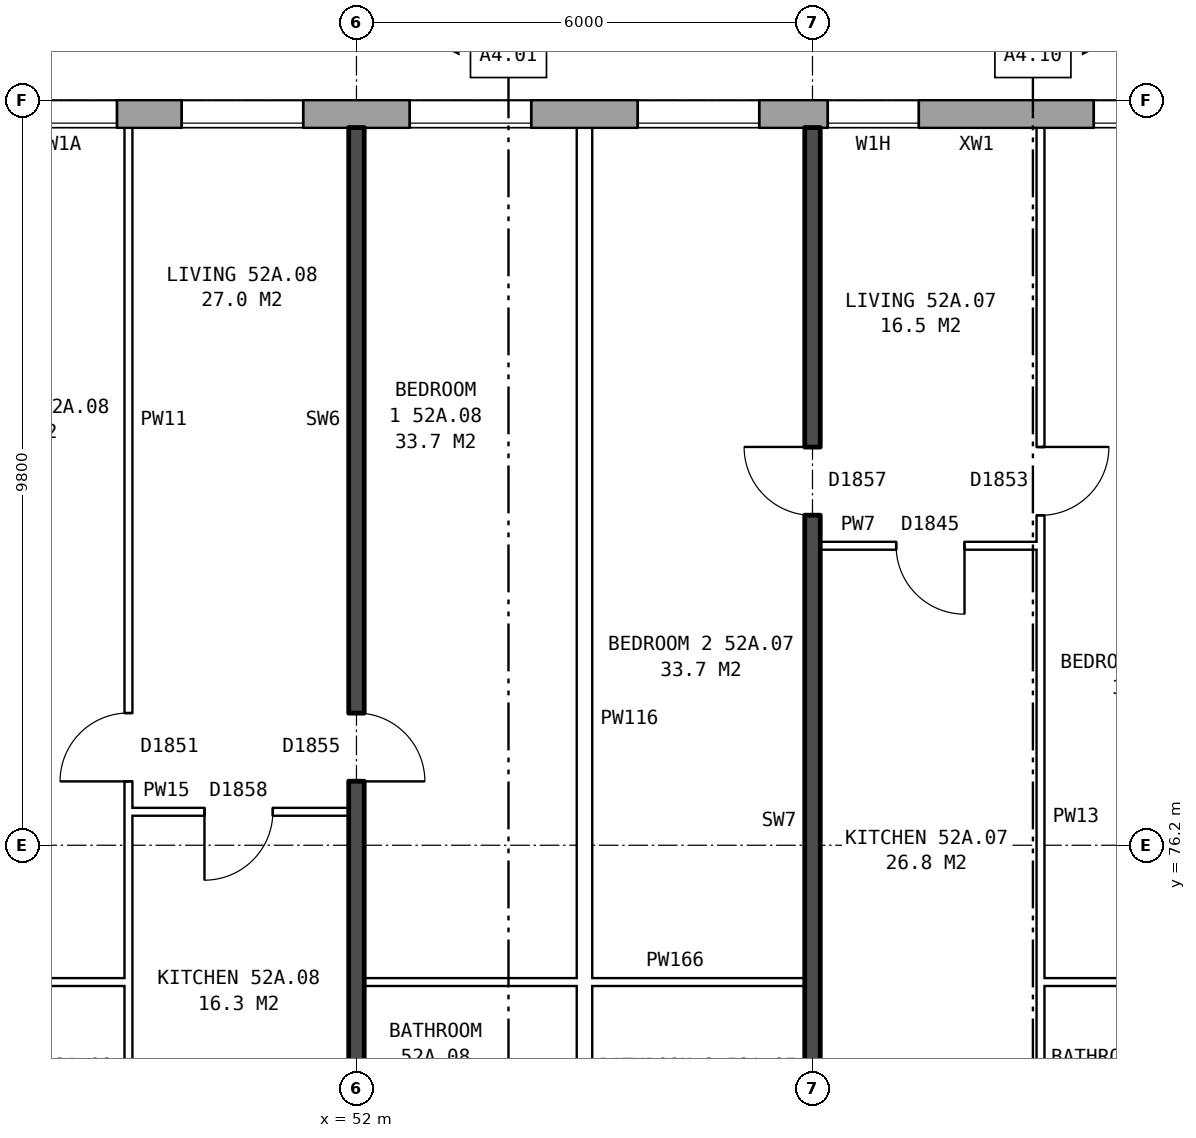
"""IFC4 building model, lengths in metres.
Left out: names, types, materials, properties, quantities, classifications, styles, units other than length and angle.
Written with IfcOpenShell. Run it as: python <this file> out.ifc"""

import sys

from ifc_helpers import new_model, si_unit, direction, frame, frame_2d, origin, place, context, subcontext, project, spatial, rectangle, extrude, element, fill, save


model = new_model("IFC4")
c1 = context("Model", 3, precision=1e-05, world=origin(), true_north=direction((0.0, 1.0)))
c2 = subcontext(c1, "Body", "Model", "MODEL_VIEW")
j1 = project(units=[si_unit("LENGTHUNIT", "METRE"), si_unit("PLANEANGLEUNIT", "RADIAN")], contexts=[c1])
p1 = place(None, origin())
s1 = spatial("IfcSite", under=j1, at=p1, CompositionType="ELEMENT")
p2 = place(p1, origin())
s2 = spatial("IfcBuilding", under=s1, at=p2, CompositionType="ELEMENT")
p3 = place(p2, frame((0.0, 0.0, 185.1)))
s3 = spatial("IfcBuildingStorey", under=s2, at=p3, CompositionType="ELEMENT", Elevation=185.1)
p4 = place(p3, frame((72.925, 85.82, 0.0), z_axis=(0.0, 0.0, 1.0), x_axis=(-1.0, 0.0, 0.0)))
e1 = element("IfcWall", 1, at=p4, inside=s3, PredefinedType="STANDARD", context=c2, shape_type="SweptSolid", body=[
    extrude(rectangle(XDim=39.601, YDim=0.36, at=frame_2d((19.8, 0.0))), origin(), (0.0, 0.0, 1.0), 2.85),
])
p5 = place(p4, frame((0.625, 0.0, 0.8)))
e2 = element("IfcOpeningElement", 2, at=p5, cuts=e1, PredefinedType="OPENING", context=c2, shape_type="SweptSolid", body=[
    extrude(rectangle(XDim=1.6, YDim=1.8, at=frame_2d((0.8, 0.9))), frame((0.0, 0.19, 0.0), z_axis=(0.0, -1.0, 0.0), x_axis=(1.0, 0.0, 0.0)), (0.0, 0.0, 1.0), 0.38),
])
p6 = place(p4, frame((3.625, 0.0, 0.8)))
e3 = element("IfcOpeningElement", 3, at=p6, cuts=e1, PredefinedType="OPENING", context=c2, shape_type="SweptSolid", body=[
    extrude(rectangle(XDim=1.6, YDim=1.8, at=frame_2d((0.8, 0.9))), frame((0.0, 0.19, 0.0), z_axis=(0.0, -1.0, 0.0), x_axis=(1.0, 0.0, 0.0)), (0.0, 0.0, 1.0), 0.38),
])
p7 = place(p4, frame((6.625, 0.0, 0.8)))
e4 = element("IfcOpeningElement", 4, at=p7, cuts=e1, PredefinedType="OPENING", context=c2, shape_type="SweptSolid", body=[
    extrude(rectangle(XDim=1.6, YDim=1.8, at=frame_2d((0.8, 0.9))), frame((0.0, 0.19, 0.0), z_axis=(0.0, -1.0, 0.0), x_axis=(1.0, 0.0, 0.0)), (0.0, 0.0, 1.0), 0.38),
])
p8 = place(p4, frame((9.625, 0.0, 0.8)))
e5 = element("IfcOpeningElement", 5, at=p8, cuts=e1, PredefinedType="OPENING", context=c2, shape_type="SweptSolid", body=[
    extrude(rectangle(XDim=1.6, YDim=1.8, at=frame_2d((0.8, 0.9))), frame((0.0, 0.19, 0.0), z_axis=(0.0, -1.0, 0.0), x_axis=(1.0, 0.0, 0.0)), (0.0, 0.0, 1.0), 0.38),
])
p9 = place(p4, frame((13.525, 0.0, 0.65)))
e6 = element("IfcOpeningElement", 6, at=p9, cuts=e1, PredefinedType="OPENING", context=c2, shape_type="SweptSolid", body=[
    extrude(rectangle(XDim=1.2, YDim=1.5, at=frame_2d((0.6, 0.75))), frame((0.0, 0.19, 0.0), z_axis=(0.0, -1.0, 0.0), x_axis=(1.0, 0.0, 0.0)), (0.0, 0.0, 1.0), 0.38),
])
p10 = place(p4, frame((15.625, 0.0, 0.8)))
e7 = element("IfcOpeningElement", 7, at=p10, cuts=e1, PredefinedType="OPENING", context=c2, shape_type="SweptSolid", body=[
    extrude(rectangle(XDim=1.6, YDim=1.8, at=frame_2d((0.8, 0.9))), frame((0.0, 0.19, 0.0), z_axis=(0.0, -1.0, 0.0), x_axis=(1.0, 0.0, 0.0)), (0.0, 0.0, 1.0), 0.38),
])
p11 = place(p4, frame((18.625, 0.0, 0.8)))
e8 = element("IfcOpeningElement", 8, at=p11, cuts=e1, PredefinedType="OPENING", context=c2, shape_type="SweptSolid", body=[
    extrude(rectangle(XDim=1.6, YDim=1.8, at=frame_2d((0.8, 0.9))), frame((0.0, 0.19, 0.0), z_axis=(0.0, -1.0, 0.0), x_axis=(1.0, 0.0, 0.0)), (0.0, 0.0, 1.0), 0.38),
])
p12 = place(p4, frame((21.625, 0.0, 0.8)))
e9 = element("IfcOpeningElement", 9, at=p12, cuts=e1, PredefinedType="OPENING", context=c2, shape_type="SweptSolid", body=[
    extrude(rectangle(XDim=1.6, YDim=1.8, at=frame_2d((0.8, 0.9))), frame((0.0, 0.19, 0.0), z_axis=(0.0, -1.0, 0.0), x_axis=(1.0, 0.0, 0.0)), (0.0, 0.0, 1.0), 0.38),
])
p13 = place(p4, frame((24.075, 0.0, 0.8)))
e10 = element("IfcOpeningElement", 10, at=p13, cuts=e1, PredefinedType="OPENING", context=c2, shape_type="SweptSolid", body=[
    extrude(rectangle(XDim=1.4, YDim=1.8, at=frame_2d((0.7, 0.9))), frame((0.0, 0.19, 0.0), z_axis=(0.0, -1.0, 0.0), x_axis=(1.0, 0.0, 0.0)), (0.0, 0.0, 1.0), 0.38),
])
p14 = place(p4, frame((27.625, 0.0, 1.7)))
e11 = element("IfcOpeningElement", 11, at=p14, cuts=e1, PredefinedType="OPENING", context=c2, shape_type="SweptSolid", body=[
    extrude(rectangle(XDim=0.8, YDim=0.9, at=frame_2d((0.4, 0.45))), frame((0.0, 0.19, 0.0), z_axis=(0.0, -1.0, 0.0), x_axis=(1.0, 0.0, 0.0)), (0.0, 0.0, 1.0), 0.38),
])
p15 = place(p4, frame((30.625, 0.0, 0.8)))
e12 = element("IfcOpeningElement", 12, at=p15, cuts=e1, PredefinedType="OPENING", context=c2, shape_type="SweptSolid", body=[
    extrude(rectangle(XDim=1.6, YDim=1.8, at=frame_2d((0.8, 0.9))), frame((0.0, 0.19, 0.0), z_axis=(0.0, -1.0, 0.0), x_axis=(1.0, 0.0, 0.0)), (0.0, 0.0, 1.0), 0.38),
])
p16 = place(p4, frame((33.625, 0.0, 0.8)))
e13 = element("IfcOpeningElement", 13, at=p16, cuts=e1, PredefinedType="OPENING", context=c2, shape_type="SweptSolid", body=[
    extrude(rectangle(XDim=1.6, YDim=1.8, at=frame_2d((0.8, 0.9))), frame((0.0, 0.19, 0.0), z_axis=(0.0, -1.0, 0.0), x_axis=(1.0, 0.0, 0.0)), (0.0, 0.0, 1.0), 0.38),
])
p17 = place(p4, frame((36.625, 0.0, 0.8)))
e14 = element("IfcOpeningElement", 14, at=p17, cuts=e1, PredefinedType="OPENING", context=c2, shape_type="SweptSolid", body=[
    extrude(rectangle(XDim=1.6, YDim=1.8, at=frame_2d((0.8, 0.9))), frame((0.0, 0.19, 0.0), z_axis=(0.0, -1.0, 0.0), x_axis=(1.0, 0.0, 0.0)), (0.0, 0.0, 1.0), 0.38),
])
p18 = place(p4, frame((25.775, 0.0, 0.8)))
e15 = element("IfcOpeningElement", 15, at=p18, cuts=e1, PredefinedType="OPENING", context=c2, shape_type="SweptSolid", body=[
    extrude(rectangle(XDim=0.6, YDim=0.9, at=frame_2d((0.3, 0.45))), frame((0.0, 0.19, 0.0), z_axis=(0.0, -1.0, 0.0), x_axis=(1.0, 0.0, 0.0)), (0.0, 0.0, 1.0), 0.38),
])
p19 = place(p4, frame((28.725, 0.0, 0.8)))
e16 = element("IfcOpeningElement", 16, at=p19, cuts=e1, PredefinedType="OPENING", context=c2, shape_type="SweptSolid", body=[
    extrude(rectangle(XDim=1.6, YDim=1.8, at=frame_2d((0.8, 0.9))), frame((0.0, 0.19, 0.0), z_axis=(0.0, -1.0, 0.0), x_axis=(1.0, 0.0, 0.0)), (0.0, 0.0, 1.0), 0.38),
])
p20 = place(p3, frame((46.1, 74.4, 0.0), z_axis=(0.0, 0.0, 1.0), x_axis=(1.0, 0.0, 0.0)))
e17 = element("IfcWall", 17, at=p20, inside=s3, PredefinedType="PARTITIONING", context=c2, shape_type="SweptSolid", body=[
    extrude(rectangle(XDim=2.9, YDim=0.1, at=frame_2d((1.45, 0.0))), origin(), (0.0, 0.0, 1.0), 2.85),
])
p21 = place(p3, frame((52.1, 74.4, 0.0), z_axis=(0.0, 0.0, 1.0), x_axis=(1.0, 0.0, 0.0)))
e18 = element("IfcWall", 18, at=p21, inside=s3, PredefinedType="PARTITIONING", context=c2, shape_type="SweptSolid", body=[
    extrude(rectangle(XDim=5.8, YDim=0.1, at=frame_2d((2.9, 0.0))), origin(), (0.0, 0.0, 1.0), 2.85),
])
p22 = place(p3, frame((61.0, 74.4, 0.0), z_axis=(0.0, 0.0, 1.0), x_axis=(1.0, 0.0, 0.0)))
e19 = element("IfcWall", 19, at=p22, inside=s3, PredefinedType="PARTITIONING", context=c2, shape_type="SweptSolid", body=[
    extrude(rectangle(XDim=2.64, YDim=0.1, at=frame_2d((1.32, 0.0))), origin(), (0.0, 0.0, 1.0), 2.85),
])
p23 = place(p3, frame((49.0, 76.64, 0.0), z_axis=(0.0, 0.0, 1.0), x_axis=(1.0, 0.0, 0.0)))
e20 = element("IfcWall", 20, at=p23, inside=s3, PredefinedType="PARTITIONING", context=c2, shape_type="SweptSolid", body=[
    extrude(rectangle(XDim=2.9, YDim=0.1, at=frame_2d((1.45, 0.0))), origin(), (0.0, 0.0, 1.0), 2.85),
])
p24 = place(p23, frame((1.0, 0.0, 0.0)))
e21 = element("IfcOpeningElement", 21, at=p24, cuts=e20, PredefinedType="OPENING", context=c2, shape_type="SweptSolid", body=[
    extrude(rectangle(XDim=0.9, YDim=2.1, at=frame_2d((0.45, 1.05))), frame((0.0, 0.06, 0.0), z_axis=(0.0, -1.0, 0.0), x_axis=(1.0, 0.0, 0.0)), (0.0, 0.0, 1.0), 0.12),
])
p25 = place(p3, frame((58.1, 80.14, 0.0), z_axis=(0.0, 0.0, 1.0), x_axis=(1.0, 0.0, 0.0)))
e22 = element("IfcWall", 22, at=p25, inside=s3, PredefinedType="PARTITIONING", context=c2, shape_type="SweptSolid", body=[
    extrude(rectangle(XDim=2.9, YDim=0.1, at=frame_2d((1.45, 0.0))), origin(), (0.0, 0.0, 1.0), 2.85),
])
p26 = place(p25, frame((1.0, 0.0, 0.0)))
e23 = element("IfcOpeningElement", 23, at=p26, cuts=e22, PredefinedType="OPENING", context=c2, shape_type="SweptSolid", body=[
    extrude(rectangle(XDim=0.9, YDim=2.1, at=frame_2d((0.45, 1.05))), frame((0.0, 0.06, 0.0), z_axis=(0.0, -1.0, 0.0), x_axis=(1.0, 0.0, 0.0)), (0.0, 0.0, 1.0), 0.12),
])
p27 = place(p3, frame((49.0, 71.3, 0.0), z_axis=(0.0, 0.0, 1.0), x_axis=(0.0, 1.0, 0.0)))
e24 = element("IfcWall", 24, at=p27, inside=s3, PredefinedType="PARTITIONING", context=c2, shape_type="SweptSolid", body=[
    extrude(rectangle(XDim=14.34, YDim=0.1, at=frame_2d((7.17, 0.0))), origin(), (0.0, 0.0, 1.0), 2.85),
])
p28 = place(p27, frame((5.74, 0.0, 0.0)))
e25 = element("IfcOpeningElement", 25, at=p28, cuts=e24, PredefinedType="OPENING", context=c2, shape_type="SweptSolid", body=[
    extrude(rectangle(XDim=0.9, YDim=2.1, at=frame_2d((0.45, 1.05))), frame((0.0, 0.06, 0.0), z_axis=(0.0, -1.0, 0.0), x_axis=(1.0, 0.0, 0.0)), (0.0, 0.0, 1.0), 0.12),
])
p29 = place(p27, frame((0.4, 0.0, 0.0)))
e26 = element("IfcOpeningElement", 26, at=p29, cuts=e24, PredefinedType="OPENING", context=c2, shape_type="SweptSolid", body=[
    extrude(rectangle(XDim=0.9, YDim=2.1, at=frame_2d((0.45, 1.05))), frame((0.0, 0.06, 0.0), z_axis=(0.0, -1.0, 0.0), x_axis=(1.0, 0.0, 0.0)), (0.0, 0.0, 1.0), 0.12),
])
p30 = place(p3, frame((52.0, 71.2, 0.0), z_axis=(0.0, 0.0, 1.0), x_axis=(0.0, 1.0, 0.0)))
e27 = element("IfcWall", 27, at=p30, inside=s3, PredefinedType="SOLIDWALL", context=c2, shape_type="SweptSolid", body=[
    extrude(rectangle(XDim=14.44, YDim=0.2, at=frame_2d((7.22, 0.0))), origin(), (0.0, 0.0, 1.0), 2.85),
])
p31 = place(p30, frame((5.84, 0.0, 0.0)))
e28 = element("IfcOpeningElement", 28, at=p31, cuts=e27, PredefinedType="OPENING", context=c2, shape_type="SweptSolid", body=[
    extrude(rectangle(XDim=0.9, YDim=2.1, at=frame_2d((0.45, 1.05))), frame((0.0, 0.11, 0.0), z_axis=(0.0, -1.0, 0.0), x_axis=(1.0, 0.0, 0.0)), (0.0, 0.0, 1.0), 0.22),
])
p32 = place(p30, frame((0.4, 0.0, 0.0)))
e29 = element("IfcOpeningElement", 29, at=p32, cuts=e27, PredefinedType="OPENING", context=c2, shape_type="SweptSolid", body=[
    extrude(rectangle(XDim=0.9, YDim=2.1, at=frame_2d((0.45, 1.05))), frame((0.0, 0.11, 0.0), z_axis=(0.0, -1.0, 0.0), x_axis=(1.0, 0.0, 0.0)), (0.0, 0.0, 1.0), 0.22),
])
p33 = place(p3, frame((55.0, 71.3, 0.0), z_axis=(0.0, 0.0, 1.0), x_axis=(0.0, 1.0, 0.0)))
e30 = element("IfcWall", 30, at=p33, inside=s3, PredefinedType="PARTITIONING", context=c2, shape_type="SweptSolid", body=[
    extrude(rectangle(XDim=14.34, YDim=0.2, at=frame_2d((7.17, 0.0))), origin(), (0.0, 0.0, 1.0), 2.85),
])
p34 = place(p3, frame((58.0, 71.2, 0.0), z_axis=(0.0, 0.0, 1.0), x_axis=(0.0, 1.0, 0.0)))
e31 = element("IfcWall", 31, at=p34, inside=s3, PredefinedType="SOLIDWALL", context=c2, shape_type="SweptSolid", body=[
    extrude(rectangle(XDim=14.44, YDim=0.2, at=frame_2d((7.22, 0.0))), origin(), (0.0, 0.0, 1.0), 2.85),
])
p35 = place(p34, frame((9.34, 0.0, 0.0)))
e32 = element("IfcOpeningElement", 32, at=p35, cuts=e31, PredefinedType="OPENING", context=c2, shape_type="SweptSolid", body=[
    extrude(rectangle(XDim=0.9, YDim=2.1, at=frame_2d((0.45, 1.05))), frame((0.0, 0.11, 0.0), z_axis=(0.0, -1.0, 0.0), x_axis=(1.0, 0.0, 0.0)), (0.0, 0.0, 1.0), 0.22),
])
p36 = place(p34, frame((0.4, 0.0, 0.0)))
e33 = element("IfcOpeningElement", 33, at=p36, cuts=e31, PredefinedType="OPENING", context=c2, shape_type="SweptSolid", body=[
    extrude(rectangle(XDim=0.9, YDim=2.1, at=frame_2d((0.45, 1.05))), frame((0.0, 0.11, 0.0), z_axis=(0.0, -1.0, 0.0), x_axis=(1.0, 0.0, 0.0)), (0.0, 0.0, 1.0), 0.22),
])
p37 = place(p3, frame((61.0, 71.3, 0.0), z_axis=(0.0, 0.0, 1.0), x_axis=(0.0, 1.0, 0.0)))
e34 = element("IfcWall", 34, at=p37, inside=s3, PredefinedType="PARTITIONING", context=c2, shape_type="SweptSolid", body=[
    extrude(rectangle(XDim=14.34, YDim=0.1, at=frame_2d((7.17, 0.0))), origin(), (0.0, 0.0, 1.0), 2.85),
])
p38 = place(p37, frame((9.24, 0.0, 0.0)))
e35 = element("IfcOpeningElement", 35, at=p38, cuts=e34, PredefinedType="OPENING", context=c2, shape_type="SweptSolid", body=[
    extrude(rectangle(XDim=0.9, YDim=2.1, at=frame_2d((0.45, 1.05))), frame((0.0, 0.06, 0.0), z_axis=(0.0, -1.0, 0.0), x_axis=(1.0, 0.0, 0.0)), (0.0, 0.0, 1.0), 0.12),
])
p39 = place(p37, frame((0.4, 0.0, 0.0)))
e36 = element("IfcOpeningElement", 36, at=p39, cuts=e34, PredefinedType="OPENING", context=c2, shape_type="SweptSolid", body=[
    extrude(rectangle(XDim=0.9, YDim=2.1, at=frame_2d((0.45, 1.05))), frame((0.0, 0.06, 0.0), z_axis=(0.0, -1.0, 0.0), x_axis=(1.0, 0.0, 0.0)), (0.0, 0.0, 1.0), 0.12),
])
p40 = place(p8, origin())
e37 = element("IfcWindow", 37, at=p40, inside=s3, PartitioningType="SINGLE_PANEL", PredefinedType="WINDOW", context=c2, shape_type="SweptSolid", body=[
    extrude(rectangle(XDim=1.6, YDim=1.8, at=frame_2d((0.8, 0.9))), frame((0.0, 0.15, 0.0), z_axis=(0.0, -1.0, 0.0), x_axis=(1.0, 0.0, 0.0)), (0.0, 0.0, 1.0), 0.06),
])
fill(e5, e37)
p41 = place(p9, origin())
e38 = element("IfcWindow", 38, at=p41, inside=s3, PartitioningType="SINGLE_PANEL", PredefinedType="WINDOW", context=c2, shape_type="SweptSolid", body=[
    extrude(rectangle(XDim=1.2, YDim=1.5, at=frame_2d((0.6, 0.75))), frame((0.0, 0.15, 0.0), z_axis=(0.0, -1.0, 0.0), x_axis=(1.0, 0.0, 0.0)), (0.0, 0.0, 1.0), 0.06),
])
fill(e6, e38)
p42 = place(p10, origin())
e39 = element("IfcWindow", 39, at=p42, inside=s3, PartitioningType="SINGLE_PANEL", PredefinedType="WINDOW", context=c2, shape_type="SweptSolid", body=[
    extrude(rectangle(XDim=1.6, YDim=1.8, at=frame_2d((0.8, 0.9))), frame((0.0, 0.15, 0.0), z_axis=(0.0, -1.0, 0.0), x_axis=(1.0, 0.0, 0.0)), (0.0, 0.0, 1.0), 0.06),
])
fill(e7, e39)
p43 = place(p11, origin())
e40 = element("IfcWindow", 40, at=p43, inside=s3, PartitioningType="SINGLE_PANEL", PredefinedType="WINDOW", context=c2, shape_type="SweptSolid", body=[
    extrude(rectangle(XDim=1.6, YDim=1.8, at=frame_2d((0.8, 0.9))), frame((0.0, 0.15, 0.0), z_axis=(0.0, -1.0, 0.0), x_axis=(1.0, 0.0, 0.0)), (0.0, 0.0, 1.0), 0.06),
])
fill(e8, e40)
p44 = place(p12, origin())
e41 = element("IfcWindow", 41, at=p44, inside=s3, PartitioningType="SINGLE_PANEL", PredefinedType="WINDOW", context=c2, shape_type="SweptSolid", body=[
    extrude(rectangle(XDim=1.6, YDim=1.8, at=frame_2d((0.8, 0.9))), frame((0.0, 0.15, 0.0), z_axis=(0.0, -1.0, 0.0), x_axis=(1.0, 0.0, 0.0)), (0.0, 0.0, 1.0), 0.06),
])
fill(e9, e41)
p45 = place(p13, origin())
e42 = element("IfcWindow", 42, at=p45, inside=s3, PartitioningType="SINGLE_PANEL", PredefinedType="WINDOW", context=c2, shape_type="SweptSolid", body=[
    extrude(rectangle(XDim=1.4, YDim=1.8, at=frame_2d((0.7, 0.9))), frame((0.0, 0.15, 0.0), z_axis=(0.0, -1.0, 0.0), x_axis=(1.0, 0.0, 0.0)), (0.0, 0.0, 1.0), 0.06),
])
fill(e10, e42)
p46 = place(p38, frame((0.9, 0.0, 0.0), z_axis=(0.0, 0.0, 1.0), x_axis=(-1.0, 0.0, 0.0)))
e43 = element("IfcDoor", 43, at=p46, inside=s3, OperationType="SINGLE_SWING_LEFT", PredefinedType="DOOR", context=c2, shape_type="SweptSolid", body=[
    extrude(rectangle(XDim=0.9, YDim=2.1, at=frame_2d((0.45, 1.05))), frame((0.0, 0.025, 0.0), z_axis=(0.0, -1.0, 0.0), x_axis=(1.0, 0.0, 0.0)), (0.0, 0.0, 1.0), 0.05),
])
fill(e35, e43)
p47 = place(p35, origin())
e44 = element("IfcDoor", 44, at=p47, inside=s3, OperationType="SINGLE_SWING_RIGHT", PredefinedType="DOOR", context=c2, shape_type="SweptSolid", body=[
    extrude(rectangle(XDim=0.9, YDim=2.1, at=frame_2d((0.45, 1.05))), frame((0.0, 0.025, 0.0), z_axis=(0.0, -1.0, 0.0), x_axis=(1.0, 0.0, 0.0)), (0.0, 0.0, 1.0), 0.05),
])
fill(e32, e44)
p48 = place(p26, frame((0.9, 0.0, 0.0), z_axis=(0.0, 0.0, 1.0), x_axis=(-1.0, 0.0, 0.0)))
e45 = element("IfcDoor", 45, at=p48, inside=s3, OperationType="SINGLE_SWING_LEFT", PredefinedType="DOOR", context=c2, shape_type="SweptSolid", body=[
    extrude(rectangle(XDim=0.9, YDim=2.1, at=frame_2d((0.45, 1.05))), frame((0.0, 0.025, 0.0), z_axis=(0.0, -1.0, 0.0), x_axis=(1.0, 0.0, 0.0)), (0.0, 0.0, 1.0), 0.05),
])
fill(e23, e45)
p49 = place(p31, frame((0.9, 0.0, 0.0), z_axis=(0.0, 0.0, 1.0), x_axis=(-1.0, 0.0, 0.0)))
e46 = element("IfcDoor", 46, at=p49, inside=s3, OperationType="SINGLE_SWING_RIGHT", PredefinedType="DOOR", context=c2, shape_type="SweptSolid", body=[
    extrude(rectangle(XDim=0.9, YDim=2.1, at=frame_2d((0.45, 1.05))), frame((0.0, 0.025, 0.0), z_axis=(0.0, -1.0, 0.0), x_axis=(1.0, 0.0, 0.0)), (0.0, 0.0, 1.0), 0.05),
])
fill(e28, e46)
p50 = place(p28, origin())
e47 = element("IfcDoor", 47, at=p50, inside=s3, OperationType="SINGLE_SWING_LEFT", PredefinedType="DOOR", context=c2, shape_type="SweptSolid", body=[
    extrude(rectangle(XDim=0.9, YDim=2.1, at=frame_2d((0.45, 1.05))), frame((0.0, 0.025, 0.0), z_axis=(0.0, -1.0, 0.0), x_axis=(1.0, 0.0, 0.0)), (0.0, 0.0, 1.0), 0.05),
])
fill(e25, e47)
p51 = place(p24, frame((0.9, 0.0, 0.0), z_axis=(0.0, 0.0, 1.0), x_axis=(-1.0, 0.0, 0.0)))
e48 = element("IfcDoor", 48, at=p51, inside=s3, OperationType="SINGLE_SWING_RIGHT", PredefinedType="DOOR", context=c2, shape_type="SweptSolid", body=[
    extrude(rectangle(XDim=0.9, YDim=2.1, at=frame_2d((0.45, 1.05))), frame((0.0, 0.025, 0.0), z_axis=(0.0, -1.0, 0.0), x_axis=(1.0, 0.0, 0.0)), (0.0, 0.0, 1.0), 0.05),
])
fill(e21, e48)
save(model, sys.argv[1])
